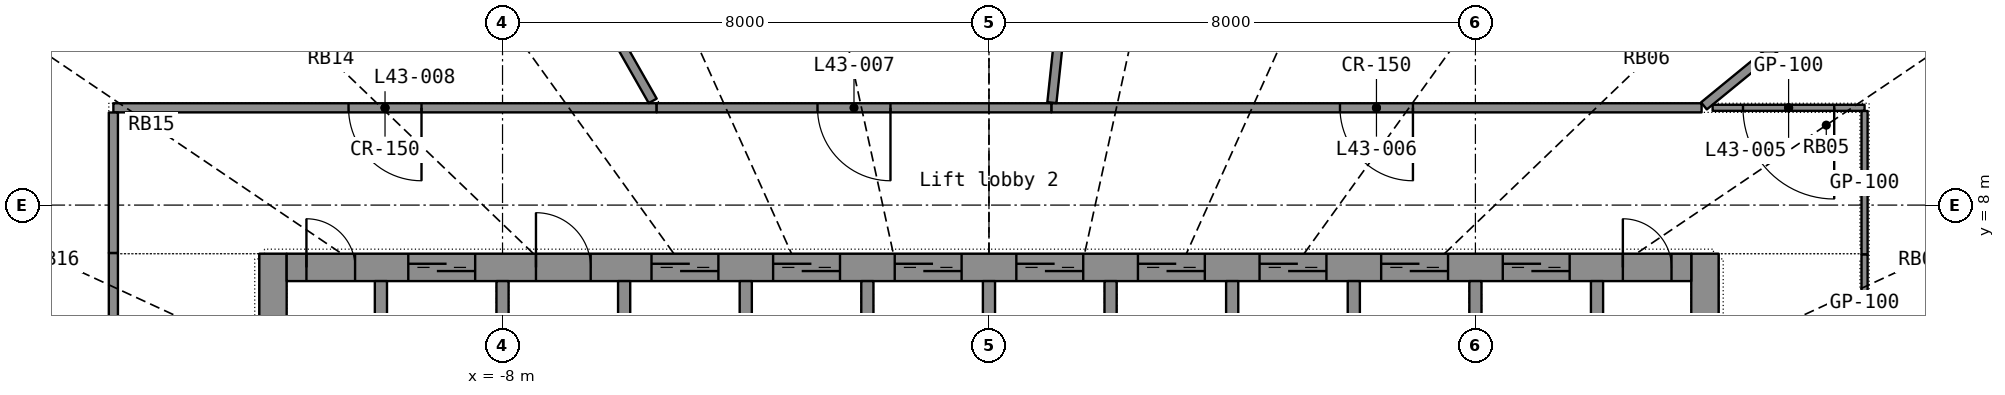
"""IFC4 building model, lengths in metres.
Left out: names, types, materials, properties, quantities, classifications, styles, units other than length and angle.
Written with IfcOpenShell. Run it as: python <this file> out.ifc"""

import sys

from ifc_helpers import new_model, si_unit, direction, frame, frame_2d, origin, place, context, subcontext, project, spatial, rectangle, extrude, element, fill, save


model = new_model("IFC4")
c1 = context("Model", 3, precision=1e-05, world=origin(), true_north=direction((0.0, 1.0)))
c2 = subcontext(c1, "Body", "Model", "MODEL_VIEW")
j1 = project(units=[si_unit("LENGTHUNIT", "METRE"), si_unit("PLANEANGLEUNIT", "RADIAN")], contexts=[c1])
p1 = place(None, origin())
s1 = spatial("IfcSite", under=j1, at=p1, CompositionType="ELEMENT")
p2 = place(p1, origin())
s2 = spatial("IfcBuilding", under=s1, at=p2, CompositionType="ELEMENT")
p3 = place(p2, frame((0.0, 0.0, 179.3)))
s3 = spatial("IfcBuildingStorey", under=s2, at=p3, CompositionType="ELEMENT", Elevation=179.3)
p4 = place(p3, frame((-11.775, -7.2, 0.0), z_axis=(0.0, 0.0, 1.0), x_axis=(0.0, 1.0, 0.0)))
e1 = element("IfcWall", 1, at=p4, inside=s3, PredefinedType="SHEAR", context=c2, shape_type="SweptSolid", body=[
    extrude(rectangle(XDim=14.4, YDim=0.45, at=frame_2d((7.2, 0.0))), origin(), (0.0, 0.0, 1.0), 3.3),
])
p5 = place(p4, frame((6.5, 0.0, 0.0)))
e2 = element("IfcOpeningElement", 2, at=p5, cuts=e1, PredefinedType="OPENING", context=c2, shape_type="SweptSolid", body=[
    extrude(rectangle(XDim=1.4, YDim=2.2, at=frame_2d((0.7, 1.1))), frame((0.0, 0.235, 0.0), z_axis=(0.0, -1.0, 0.0), x_axis=(1.0, 0.0, 0.0)), (0.0, 0.0, 1.0), 0.47),
])
p6 = place(p3, frame((11.775, -7.2, 0.0), z_axis=(0.0, 0.0, 1.0), x_axis=(0.0, 1.0, 0.0)))
e3 = element("IfcWall", 3, at=p6, inside=s3, PredefinedType="SHEAR", context=c2, shape_type="SweptSolid", body=[
    extrude(rectangle(XDim=14.4, YDim=0.45, at=frame_2d((7.2, 0.0))), origin(), (0.0, 0.0, 1.0), 3.3),
])
p7 = place(p6, frame((6.5, 0.0, 0.0)))
e4 = element("IfcOpeningElement", 4, at=p7, cuts=e3, PredefinedType="OPENING", context=c2, shape_type="SweptSolid", body=[
    extrude(rectangle(XDim=1.4, YDim=2.2, at=frame_2d((0.7, 1.1))), frame((0.0, 0.235, 0.0), z_axis=(0.0, -1.0, 0.0), x_axis=(1.0, 0.0, 0.0)), (0.0, 0.0, 1.0), 0.47),
])
p8 = place(p3, frame((-11.55, 6.975, 0.0), z_axis=(0.0, 0.0, 1.0), x_axis=(1.0, 0.0, 0.0)))
e5 = element("IfcWall", 5, at=p8, inside=s3, PredefinedType="SHEAR", context=c2, shape_type="SweptSolid", body=[
    extrude(rectangle(XDim=23.1, YDim=0.45, at=frame_2d((11.55, 0.0))), origin(), (0.0, 0.0, 1.0), 3.3),
])
p9 = place(p8, frame((2.0, 0.0, 0.0)))
e6 = element("IfcOpeningElement", 6, at=p9, cuts=e5, PredefinedType="OPENING", context=c2, shape_type="SweptSolid", body=[
    extrude(rectangle(XDim=1.1, YDim=2.2, at=frame_2d((0.55, 1.1))), frame((0.0, 0.235, 0.0), z_axis=(0.0, -1.0, 0.0), x_axis=(1.0, 0.0, 0.0)), (0.0, 0.0, 1.0), 0.47),
])
p10 = place(p8, frame((6.0, 0.0, 0.0)))
e7 = element("IfcOpeningElement", 7, at=p10, cuts=e5, PredefinedType="OPENING", context=c2, shape_type="SweptSolid", body=[
    extrude(rectangle(XDim=1.1, YDim=2.2, at=frame_2d((0.55, 1.1))), frame((0.0, 0.235, 0.0), z_axis=(0.0, -1.0, 0.0), x_axis=(1.0, 0.0, 0.0)), (0.0, 0.0, 1.0), 0.47),
])
p11 = place(p8, frame((8.0, 0.0, 0.0)))
e8 = element("IfcOpeningElement", 8, at=p11, cuts=e5, PredefinedType="OPENING", context=c2, shape_type="SweptSolid", body=[
    extrude(rectangle(XDim=1.1, YDim=2.2, at=frame_2d((0.55, 1.1))), frame((0.0, 0.235, 0.0), z_axis=(0.0, -1.0, 0.0), x_axis=(1.0, 0.0, 0.0)), (0.0, 0.0, 1.0), 0.47),
])
p12 = place(p8, frame((10.0, 0.0, 0.0)))
e9 = element("IfcOpeningElement", 9, at=p12, cuts=e5, PredefinedType="OPENING", context=c2, shape_type="SweptSolid", body=[
    extrude(rectangle(XDim=1.1, YDim=2.2, at=frame_2d((0.55, 1.1))), frame((0.0, 0.235, 0.0), z_axis=(0.0, -1.0, 0.0), x_axis=(1.0, 0.0, 0.0)), (0.0, 0.0, 1.0), 0.47),
])
p13 = place(p8, frame((12.0, 0.0, 0.0)))
e10 = element("IfcOpeningElement", 10, at=p13, cuts=e5, PredefinedType="OPENING", context=c2, shape_type="SweptSolid", body=[
    extrude(rectangle(XDim=1.1, YDim=2.2, at=frame_2d((0.55, 1.1))), frame((0.0, 0.235, 0.0), z_axis=(0.0, -1.0, 0.0), x_axis=(1.0, 0.0, 0.0)), (0.0, 0.0, 1.0), 0.47),
])
p14 = place(p8, frame((14.0, 0.0, 0.0)))
e11 = element("IfcOpeningElement", 11, at=p14, cuts=e5, PredefinedType="OPENING", context=c2, shape_type="SweptSolid", body=[
    extrude(rectangle(XDim=1.1, YDim=2.2, at=frame_2d((0.55, 1.1))), frame((0.0, 0.235, 0.0), z_axis=(0.0, -1.0, 0.0), x_axis=(1.0, 0.0, 0.0)), (0.0, 0.0, 1.0), 0.47),
])
p15 = place(p8, frame((16.0, 0.0, 0.0)))
e12 = element("IfcOpeningElement", 12, at=p15, cuts=e5, PredefinedType="OPENING", context=c2, shape_type="SweptSolid", body=[
    extrude(rectangle(XDim=1.1, YDim=2.2, at=frame_2d((0.55, 1.1))), frame((0.0, 0.235, 0.0), z_axis=(0.0, -1.0, 0.0), x_axis=(1.0, 0.0, 0.0)), (0.0, 0.0, 1.0), 0.47),
])
p16 = place(p8, frame((18.0, 0.0, 0.0)))
e13 = element("IfcOpeningElement", 13, at=p16, cuts=e5, PredefinedType="OPENING", context=c2, shape_type="SweptSolid", body=[
    extrude(rectangle(XDim=1.1, YDim=2.2, at=frame_2d((0.55, 1.1))), frame((0.0, 0.235, 0.0), z_axis=(0.0, -1.0, 0.0), x_axis=(1.0, 0.0, 0.0)), (0.0, 0.0, 1.0), 0.47),
])
p17 = place(p8, frame((20.0, 0.0, 0.0)))
e14 = element("IfcOpeningElement", 14, at=p17, cuts=e5, PredefinedType="OPENING", context=c2, shape_type="SweptSolid", body=[
    extrude(rectangle(XDim=1.1, YDim=2.2, at=frame_2d((0.55, 1.1))), frame((0.0, 0.235, 0.0), z_axis=(0.0, -1.0, 0.0), x_axis=(1.0, 0.0, 0.0)), (0.0, 0.0, 1.0), 0.47),
])
p18 = place(p8, frame((4.1, 0.0, 0.0)))
e15 = element("IfcOpeningElement", 15, at=p18, cuts=e5, PredefinedType="OPENING", context=c2, shape_type="SweptSolid", body=[
    extrude(rectangle(XDim=0.9, YDim=2.1, at=frame_2d((0.45, 1.05))), frame((0.0, 0.235, 0.0), z_axis=(0.0, -1.0, 0.0), x_axis=(1.0, 0.0, 0.0)), (0.0, 0.0, 1.0), 0.47),
])
p19 = place(p8, frame((0.325, 0.0, 0.0)))
e16 = element("IfcOpeningElement", 16, at=p19, cuts=e5, PredefinedType="OPENING", context=c2, shape_type="SweptSolid", body=[
    extrude(rectangle(XDim=0.8, YDim=2.05, at=frame_2d((0.4, 1.025))), frame((0.0, 0.235, 0.0), z_axis=(0.0, -1.0, 0.0), x_axis=(1.0, 0.0, 0.0)), (0.0, 0.0, 1.0), 0.47),
])
p20 = place(p8, frame((21.975, 0.0, 0.0)))
e17 = element("IfcOpeningElement", 17, at=p20, cuts=e5, PredefinedType="OPENING", context=c2, shape_type="SweptSolid", body=[
    extrude(rectangle(XDim=0.8, YDim=2.05, at=frame_2d((0.4, 1.025))), frame((0.0, 0.235, 0.0), z_axis=(0.0, -1.0, 0.0), x_axis=(1.0, 0.0, 0.0)), (0.0, 0.0, 1.0), 0.47),
])
for number, where, z_axis, x_axis in (
    (18, (-10.0, 3.9, 0.0), (0.0, 0.0, 1.0), (0.0, 1.0, 0.0)),
    (19, (-8.0, 3.9, 0.0), (0.0, 0.0, 1.0), (0.0, 1.0, 0.0)),
    (20, (-6.0, 3.9, 0.0), (0.0, 0.0, 1.0), (0.0, 1.0, 0.0)),
    (21, (-4.0, 3.9, 0.0), (0.0, 0.0, 1.0), (0.0, 1.0, 0.0)),
    (22, (-2.0, 3.9, 0.0), (0.0, 0.0, 1.0), (0.0, 1.0, 0.0)),
    (23, (0.0, 3.9, 0.0), (0.0, 0.0, 1.0), (0.0, 1.0, 0.0)),
    (24, (2.0, 3.9, 0.0), (0.0, 0.0, 1.0), (0.0, 1.0, 0.0)),
    (25, (4.0, 3.9, 0.0), (0.0, 0.0, 1.0), (0.0, 1.0, 0.0)),
    (26, (6.0, 3.9, 0.0), (0.0, 0.0, 1.0), (0.0, 1.0, 0.0)),
    (27, (8.0, 3.9, 0.0), (0.0, 0.0, 1.0), (0.0, 1.0, 0.0)),
    (28, (10.0, 3.9, 0.0), (0.0, 0.0, 1.0), (0.0, 1.0, 0.0)),
):
    element("IfcWall", number, at=place(p3, frame(where, z_axis=z_axis, x_axis=x_axis)), inside=s3, PredefinedType="SHEAR", context=c2, shape_type="SweptSolid", body=[
        extrude(rectangle(XDim=2.85, YDim=0.2, at=frame_2d((1.425, 0.0))), origin(), (0.0, 0.0, 1.0), 3.3),
    ])
p21 = place(p3, frame((11.72, 9.6, 0.0), z_axis=(0.0, 0.0, 1.0), x_axis=(-1.0, 0.0, 0.0)))
e29 = element("IfcWall", 29, at=p21, inside=s3, PredefinedType="PARTITIONING", context=c2, shape_type="SweptSolid", body=[
    extrude(rectangle(XDim=10.695, YDim=0.15, at=frame_2d((5.347, 0.0))), origin(), (0.0, 0.0, 1.0), 2.4),
])
p22 = place(p21, frame((4.747, 0.0, 0.0)))
e30 = element("IfcOpeningElement", 30, at=p22, cuts=e29, PredefinedType="OPENING", context=c2, shape_type="SweptSolid", body=[
    extrude(rectangle(XDim=1.2, YDim=2.2, at=frame_2d((0.6, 1.1))), frame((0.0, 0.085, 0.0), z_axis=(0.0, -1.0, 0.0), x_axis=(1.0, 0.0, 0.0)), (0.0, 0.0, 1.0), 0.17),
])
p23 = place(p3, frame((2.004, 18.766, 0.0), z_axis=(0.0, 0.0, 1.0), x_axis=(-0.106208417, -0.99434389, 0.0)))
e31 = element("IfcWall", 31, at=p23, inside=s3, PredefinedType="PARTITIONING", context=c2, shape_type="SweptSolid", body=[
    extrude(rectangle(XDim=9.133, YDim=0.15, at=frame_2d((4.566, 0.0))), origin(), (0.0, 0.0, 1.0), 2.4),
])
p24 = place(p3, frame((-5.465, 9.6, 0.0), z_axis=(0.0, 0.0, 1.0), x_axis=(-1.0, 0.0, 0.0)))
e32 = element("IfcWall", 32, at=p24, inside=s3, PredefinedType="PARTITIONING", context=c2, shape_type="SweptSolid", body=[
    extrude(rectangle(XDim=8.935, YDim=0.15, at=frame_2d((4.467, 0.0))), origin(), (0.0, 0.0, 1.0), 2.4),
])
p25 = place(p24, frame((3.867, 0.0, 0.0)))
e33 = element("IfcOpeningElement", 33, at=p25, cuts=e32, PredefinedType="OPENING", context=c2, shape_type="SweptSolid", body=[
    extrude(rectangle(XDim=1.2, YDim=2.2, at=frame_2d((0.6, 1.1))), frame((0.0, 0.085, 0.0), z_axis=(0.0, -1.0, 0.0), x_axis=(1.0, 0.0, 0.0)), (0.0, 0.0, 1.0), 0.17),
])
p26 = place(p3, frame((-9.722, 17.077, 0.0), z_axis=(0.0, 0.0, 1.0), x_axis=(0.494732537, -0.86904529, 0.0)))
e34 = element("IfcWall", 34, at=p26, inside=s3, PredefinedType="PARTITIONING", context=c2, shape_type="SweptSolid", body=[
    extrude(rectangle(XDim=8.473, YDim=0.15, at=frame_2d((4.236, 0.0))), origin(), (0.0, 0.0, 1.0), 2.4),
])
p27 = place(p3, frame((20.862, 7.969, 0.0), z_axis=(0.0, 0.0, 1.0), x_axis=(-0.934170905, -0.356825897, 0.0)))
e35 = element("IfcWall", 35, at=p27, inside=s3, PredefinedType="PARTITIONING", context=c2, shape_type="SweptSolid", body=[
    extrude(rectangle(XDim=6.917, YDim=0.15, at=frame_2d((3.458, 0.0))), origin(), (0.0, 0.0, 1.0), 2.4),
])
p28 = place(p3, frame((1.025, 9.6, 0.0), z_axis=(0.0, 0.0, 1.0), x_axis=(-1.0, 0.0, 0.0)))
e36 = element("IfcWall", 36, at=p28, inside=s3, PredefinedType="PARTITIONING", context=c2, shape_type="SweptSolid", body=[
    extrude(rectangle(XDim=6.49, YDim=0.15, at=frame_2d((3.245, 0.0))), origin(), (0.0, 0.0, 1.0), 2.4),
])
p29 = place(p28, frame((2.645, 0.0, 0.0)))
e37 = element("IfcOpeningElement", 37, at=p29, cuts=e36, PredefinedType="OPENING", context=c2, shape_type="SweptSolid", body=[
    extrude(rectangle(XDim=1.2, YDim=2.2, at=frame_2d((0.6, 1.1))), frame((0.0, 0.085, 0.0), z_axis=(0.0, -1.0, 0.0), x_axis=(1.0, 0.0, 0.0)), (0.0, 0.0, 1.0), 0.17),
])
p30 = place(p3, frame((16.27, 13.327, 0.0), z_axis=(0.0, 0.0, 1.0), x_axis=(-0.773587881, -0.633689033, 0.0)))
e38 = element("IfcWall", 38, at=p30, inside=s3, PredefinedType="PARTITIONING", context=c2, shape_type="SweptSolid", body=[
    extrude(rectangle(XDim=5.832, YDim=0.15, at=frame_2d((2.916, 0.0))), origin(), (0.0, 0.0, 1.0), 2.4),
])
p31 = place(p3, frame((-14.4, 7.212, 0.0), z_axis=(0.0, 0.0, 1.0), x_axis=(0.0, -1.0, 0.0)))
e39 = element("IfcWall", 39, at=p31, inside=s3, PredefinedType="PARTITIONING", context=c2, shape_type="SweptSolid", body=[
    extrude(rectangle(XDim=5.635, YDim=0.15, at=frame_2d((2.817, 0.0))), origin(), (0.0, 0.0, 1.0), 2.4),
])
p32 = place(p3, frame((14.4, 9.6, 0.0), z_axis=(0.0, 0.0, 1.0), x_axis=(-1.0, 0.0, 0.0)))
e40 = element("IfcWall", 40, at=p32, inside=s3, PredefinedType="PARTITIONING", context=c2, shape_type="SweptSolid", body=[
    extrude(rectangle(XDim=2.499, YDim=0.1, at=frame_2d((1.249, 0.0))), origin(), (0.0, 0.0, 1.0), 2.4),
])
p33 = place(p32, frame((0.499, 0.0, 0.0)))
e41 = element("IfcOpeningElement", 41, at=p33, cuts=e40, PredefinedType="OPENING", context=c2, shape_type="SweptSolid", body=[
    extrude(rectangle(XDim=1.5, YDim=2.4, at=frame_2d((0.75, 1.2))), frame((0.0, 0.06, 0.0), z_axis=(0.0, -1.0, 0.0), x_axis=(1.0, 0.0, 0.0)), (0.0, 0.0, 1.0), 0.12),
])
p34 = place(p3, frame((-14.4, 9.523, 0.0), z_axis=(0.0, 0.0, 1.0), x_axis=(0.0, -1.0, 0.0)))
e42 = element("IfcWall", 42, at=p34, inside=s3, PredefinedType="PARTITIONING", context=c2, shape_type="SweptSolid", body=[
    extrude(rectangle(XDim=2.31, YDim=0.15, at=frame_2d((1.155, 0.0))), origin(), (0.0, 0.0, 1.0), 2.4),
])
p35 = place(p3, frame((14.4, 7.188, 0.0), z_axis=(0.0, 0.0, 1.0), x_axis=(0.0, 1.0, 0.0)))
e43 = element("IfcWall", 43, at=p35, inside=s3, PredefinedType="PARTITIONING", context=c2, shape_type="SweptSolid", body=[
    extrude(rectangle(XDim=2.36, YDim=0.1, at=frame_2d((1.18, 0.0))), origin(), (0.0, 0.0, 1.0), 2.4),
])
p36 = place(p3, frame((14.4, 5.602, 0.0), z_axis=(0.0, 0.0, 1.0), x_axis=(0.0, 1.0, 0.0)))
e44 = element("IfcWall", 44, at=p36, inside=s3, PredefinedType="PARTITIONING", context=c2, shape_type="SweptSolid", body=[
    extrude(rectangle(XDim=1.585, YDim=0.1, at=frame_2d((0.793, 0.0))), origin(), (0.0, 0.0, 1.0), 2.4),
])
p37 = place(p9, origin())
e45 = element("IfcDoor", 45, at=p37, inside=s3, OperationType="DOUBLE_DOOR_SLIDING", PredefinedType="DOOR", context=c2, shape_type="SweptSolid", body=[
    extrude(rectangle(XDim=1.1, YDim=2.2, at=frame_2d((0.55, 1.1))), frame((0.0, 0.025, 0.0), z_axis=(0.0, -1.0, 0.0), x_axis=(1.0, 0.0, 0.0)), (0.0, 0.0, 1.0), 0.05),
])
fill(e6, e45)
p38 = place(p10, origin())
e46 = element("IfcDoor", 46, at=p38, inside=s3, OperationType="DOUBLE_DOOR_SLIDING", PredefinedType="DOOR", context=c2, shape_type="SweptSolid", body=[
    extrude(rectangle(XDim=1.1, YDim=2.2, at=frame_2d((0.55, 1.1))), frame((0.0, 0.025, 0.0), z_axis=(0.0, -1.0, 0.0), x_axis=(1.0, 0.0, 0.0)), (0.0, 0.0, 1.0), 0.05),
])
fill(e7, e46)
p39 = place(p11, origin())
e47 = element("IfcDoor", 47, at=p39, inside=s3, OperationType="DOUBLE_DOOR_SLIDING", PredefinedType="DOOR", context=c2, shape_type="SweptSolid", body=[
    extrude(rectangle(XDim=1.1, YDim=2.2, at=frame_2d((0.55, 1.1))), frame((0.0, 0.025, 0.0), z_axis=(0.0, -1.0, 0.0), x_axis=(1.0, 0.0, 0.0)), (0.0, 0.0, 1.0), 0.05),
])
fill(e8, e47)
p40 = place(p12, origin())
e48 = element("IfcDoor", 48, at=p40, inside=s3, OperationType="DOUBLE_DOOR_SLIDING", PredefinedType="DOOR", context=c2, shape_type="SweptSolid", body=[
    extrude(rectangle(XDim=1.1, YDim=2.2, at=frame_2d((0.55, 1.1))), frame((0.0, 0.025, 0.0), z_axis=(0.0, -1.0, 0.0), x_axis=(1.0, 0.0, 0.0)), (0.0, 0.0, 1.0), 0.05),
])
fill(e9, e48)
p41 = place(p13, origin())
e49 = element("IfcDoor", 49, at=p41, inside=s3, OperationType="DOUBLE_DOOR_SLIDING", PredefinedType="DOOR", context=c2, shape_type="SweptSolid", body=[
    extrude(rectangle(XDim=1.1, YDim=2.2, at=frame_2d((0.55, 1.1))), frame((0.0, 0.025, 0.0), z_axis=(0.0, -1.0, 0.0), x_axis=(1.0, 0.0, 0.0)), (0.0, 0.0, 1.0), 0.05),
])
fill(e10, e49)
p42 = place(p14, origin())
e50 = element("IfcDoor", 50, at=p42, inside=s3, OperationType="DOUBLE_DOOR_SLIDING", PredefinedType="DOOR", context=c2, shape_type="SweptSolid", body=[
    extrude(rectangle(XDim=1.1, YDim=2.2, at=frame_2d((0.55, 1.1))), frame((0.0, 0.025, 0.0), z_axis=(0.0, -1.0, 0.0), x_axis=(1.0, 0.0, 0.0)), (0.0, 0.0, 1.0), 0.05),
])
fill(e11, e50)
p43 = place(p15, origin())
e51 = element("IfcDoor", 51, at=p43, inside=s3, OperationType="DOUBLE_DOOR_SLIDING", PredefinedType="DOOR", context=c2, shape_type="SweptSolid", body=[
    extrude(rectangle(XDim=1.1, YDim=2.2, at=frame_2d((0.55, 1.1))), frame((0.0, 0.025, 0.0), z_axis=(0.0, -1.0, 0.0), x_axis=(1.0, 0.0, 0.0)), (0.0, 0.0, 1.0), 0.05),
])
fill(e12, e51)
p44 = place(p16, origin())
e52 = element("IfcDoor", 52, at=p44, inside=s3, OperationType="DOUBLE_DOOR_SLIDING", PredefinedType="DOOR", context=c2, shape_type="SweptSolid", body=[
    extrude(rectangle(XDim=1.1, YDim=2.2, at=frame_2d((0.55, 1.1))), frame((0.0, 0.025, 0.0), z_axis=(0.0, -1.0, 0.0), x_axis=(1.0, 0.0, 0.0)), (0.0, 0.0, 1.0), 0.05),
])
fill(e13, e52)
p45 = place(p17, origin())
e53 = element("IfcDoor", 53, at=p45, inside=s3, OperationType="DOUBLE_DOOR_SLIDING", PredefinedType="DOOR", context=c2, shape_type="SweptSolid", body=[
    extrude(rectangle(XDim=1.1, YDim=2.2, at=frame_2d((0.55, 1.1))), frame((0.0, 0.025, 0.0), z_axis=(0.0, -1.0, 0.0), x_axis=(1.0, 0.0, 0.0)), (0.0, 0.0, 1.0), 0.05),
])
fill(e14, e53)
p46 = place(p18, origin())
e54 = element("IfcDoor", 54, at=p46, inside=s3, OperationType="SINGLE_SWING_LEFT", PredefinedType="DOOR", context=c2, shape_type="SweptSolid", body=[
    extrude(rectangle(XDim=0.9, YDim=2.1, at=frame_2d((0.45, 1.05))), frame((0.0, 0.025, 0.0), z_axis=(0.0, -1.0, 0.0), x_axis=(1.0, 0.0, 0.0)), (0.0, 0.0, 1.0), 0.05),
])
fill(e15, e54)
p47 = place(p19, origin())
e55 = element("IfcDoor", 55, at=p47, inside=s3, OperationType="SINGLE_SWING_LEFT", PredefinedType="DOOR", context=c2, shape_type="SweptSolid", body=[
    extrude(rectangle(XDim=0.8, YDim=2.05, at=frame_2d((0.4, 1.025))), frame((0.0, 0.025, 0.0), z_axis=(0.0, -1.0, 0.0), x_axis=(1.0, 0.0, 0.0)), (0.0, 0.0, 1.0), 0.05),
])
fill(e16, e55)
p48 = place(p20, origin())
e56 = element("IfcDoor", 56, at=p48, inside=s3, OperationType="SINGLE_SWING_LEFT", PredefinedType="DOOR", context=c2, shape_type="SweptSolid", body=[
    extrude(rectangle(XDim=0.8, YDim=2.05, at=frame_2d((0.4, 1.025))), frame((0.0, 0.025, 0.0), z_axis=(0.0, -1.0, 0.0), x_axis=(1.0, 0.0, 0.0)), (0.0, 0.0, 1.0), 0.05),
])
fill(e17, e56)
p49 = place(p33, origin())
e57 = element("IfcDoor", 57, at=p49, inside=s3, OperationType="DOUBLE_DOOR_SINGLE_SWING", PredefinedType="DOOR", context=c2, shape_type="SweptSolid", body=[
    extrude(rectangle(XDim=1.5, YDim=2.4, at=frame_2d((0.75, 1.2))), frame((0.0, 0.025, 0.0), z_axis=(0.0, -1.0, 0.0), x_axis=(1.0, 0.0, 0.0)), (0.0, 0.0, 1.0), 0.05),
])
fill(e41, e57)
p50 = place(p22, origin())
e58 = element("IfcDoor", 58, at=p50, inside=s3, OperationType="DOUBLE_DOOR_SINGLE_SWING", PredefinedType="DOOR", context=c2, shape_type="SweptSolid", body=[
    extrude(rectangle(XDim=1.2, YDim=2.2, at=frame_2d((0.6, 1.1))), frame((0.0, 0.025, 0.0), z_axis=(0.0, -1.0, 0.0), x_axis=(1.0, 0.0, 0.0)), (0.0, 0.0, 1.0), 0.05),
])
fill(e30, e58)
p51 = place(p29, origin())
e59 = element("IfcDoor", 59, at=p51, inside=s3, OperationType="DOUBLE_DOOR_SINGLE_SWING", PredefinedType="DOOR", context=c2, shape_type="SweptSolid", body=[
    extrude(rectangle(XDim=1.2, YDim=2.2, at=frame_2d((0.6, 1.1))), frame((0.0, 0.025, 0.0), z_axis=(0.0, -1.0, 0.0), x_axis=(1.0, 0.0, 0.0)), (0.0, 0.0, 1.0), 0.05),
])
fill(e37, e59)
p52 = place(p25, origin())
e60 = element("IfcDoor", 60, at=p52, inside=s3, OperationType="DOUBLE_DOOR_SINGLE_SWING", PredefinedType="DOOR", context=c2, shape_type="SweptSolid", body=[
    extrude(rectangle(XDim=1.2, YDim=2.2, at=frame_2d((0.6, 1.1))), frame((0.0, 0.025, 0.0), z_axis=(0.0, -1.0, 0.0), x_axis=(1.0, 0.0, 0.0)), (0.0, 0.0, 1.0), 0.05),
])
fill(e33, e60)
save(model, sys.argv[1])
